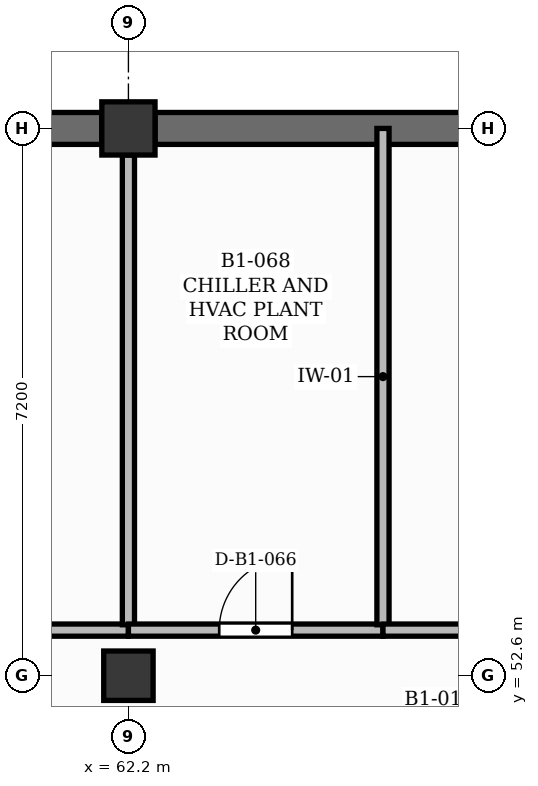
"""IFC4 building model, lengths in metres.
Left out: names, types, materials, properties, quantities, classifications, styles, units other than length and angle.
Written with IfcOpenShell. Run it as: python <this file> out.ifc"""

import sys

from ifc_helpers import new_model, si_unit, direction, frame, frame_2d, origin, origin_2d, place, context, subcontext, project, spatial, rectangle, extrude, element, fill, save


model = new_model("IFC4")
c1 = context("Model", 3, precision=1e-05, world=origin(), true_north=direction((0.0, 1.0)))
c2 = subcontext(c1, "Body", "Model", "MODEL_VIEW")
j1 = project(units=[si_unit("LENGTHUNIT", "METRE"), si_unit("PLANEANGLEUNIT", "RADIAN")], contexts=[c1])
p1 = place(None, origin())
s1 = spatial("IfcSite", under=j1, at=p1, CompositionType="ELEMENT")
p2 = place(p1, origin())
s2 = spatial("IfcBuilding", under=s1, at=p2, CompositionType="ELEMENT")
p3 = place(p2, frame((0.0, 0.0, -4.5)))
s3 = spatial("IfcBuildingStorey", under=s2, at=p3, CompositionType="ELEMENT", Elevation=-4.5)
p4 = place(p3, frame((62.2, 52.6, 0.0), z_axis=(0.0, 0.0, 1.0), x_axis=(1.0, 0.0, 0.0)))
e1 = element("IfcColumn", 1, at=p4, inside=s3, PredefinedType="COLUMN", context=c2, shape_type="SweptSolid", body=[
    extrude(rectangle(XDim=0.65, YDim=0.65, at=origin_2d()), origin(), (0.0, 0.0, 1.0), 4.2),
])
p5 = place(p3, frame((62.2, 59.8, 0.0), z_axis=(0.0, 0.0, 1.0), x_axis=(1.0, 0.0, 0.0)))
e2 = element("IfcColumn", 2, at=p5, inside=s3, PredefinedType="COLUMN", context=c2, shape_type="SweptSolid", body=[
    extrude(rectangle(XDim=0.7, YDim=0.7, at=origin_2d()), origin(), (0.0, 0.0, 1.0), 4.2),
])
p6 = place(p3, frame((58.775, 59.8, 0.0), z_axis=(0.0, 0.0, 1.0), x_axis=(1.0, 0.0, 0.0)))
e3 = element("IfcWall", 3, at=p6, inside=s3, PredefinedType="USERDEFINED", context=c2, shape_type="SweptSolid", body=[
    extrude(rectangle(XDim=3.075, YDim=0.42, at=frame_2d((1.538, 0.0))), origin(), (0.0, 0.0, 1.0), 4.2),
])
p7 = place(p3, frame((62.55, 59.8, 0.0), z_axis=(0.0, 0.0, 1.0), x_axis=(1.0, 0.0, 0.0)))
e4 = element("IfcWall", 4, at=p7, inside=s3, PredefinedType="USERDEFINED", context=c2, shape_type="SweptSolid", body=[
    extrude(rectangle(XDim=8.175, YDim=0.42, at=frame_2d((4.087, 0.0))), origin(), (0.0, 0.0, 1.0), 4.2),
])
p8 = place(p3, frame((55.0, 53.2, 0.0), z_axis=(0.0, 0.0, 1.0), x_axis=(1.0, 0.0, 0.0)))
e5 = element("IfcWall", 5, at=p8, inside=s3, PredefinedType="PARTITIONING", context=c2, shape_type="SweptSolid", body=[
    extrude(rectangle(XDim=7.2, YDim=0.16, at=frame_2d((3.6, 0.0))), origin(), (0.0, 0.0, 1.0), 4.08),
])
p9 = place(p8, frame((3.12, 0.0, 0.0)))
e6 = element("IfcOpeningElement", 6, at=p9, cuts=e5, PredefinedType="OPENING", context=c2, shape_type="SweptSolid", body=[
    extrude(rectangle(XDim=0.96, YDim=2.1, at=frame_2d((0.48, 1.05))), frame((0.0, 0.09, 0.0), z_axis=(0.0, -1.0, 0.0), x_axis=(1.0, 0.0, 0.0)), (0.0, 0.0, 1.0), 0.18),
])
p10 = place(p3, frame((62.2, 53.27, 0.0), z_axis=(0.0, 0.0, 1.0), x_axis=(0.0, 1.0, 0.0)))
e7 = element("IfcWall", 7, at=p10, inside=s3, PredefinedType="PARTITIONING", context=c2, shape_type="SweptSolid", body=[
    extrude(rectangle(XDim=6.18, YDim=0.16, at=frame_2d((3.09, 0.0))), origin(), (0.0, 0.0, 1.0), 3.5),
])
p11 = place(p3, frame((62.2, 53.2, 0.0), z_axis=(0.0, 0.0, 1.0), x_axis=(1.0, 0.0, 0.0)))
e8 = element("IfcWall", 8, at=p11, inside=s3, PredefinedType="PARTITIONING", context=c2, shape_type="SweptSolid", body=[
    extrude(rectangle(XDim=3.349, YDim=0.16, at=frame_2d((1.675, 0.0))), origin(), (0.0, 0.0, 1.0), 4.08),
])
p12 = place(p11, frame((1.195, 0.0, 0.0)))
e9 = element("IfcOpeningElement", 9, at=p12, cuts=e8, PredefinedType="OPENING", context=c2, shape_type="SweptSolid", body=[
    extrude(rectangle(XDim=0.96, YDim=2.1, at=frame_2d((0.48, 1.05))), frame((0.0, 0.09, 0.0), z_axis=(0.0, -1.0, 0.0), x_axis=(1.0, 0.0, 0.0)), (0.0, 0.0, 1.0), 0.18),
])
p13 = place(p3, frame((65.549, 53.27, 0.0), z_axis=(0.0, 0.0, 1.0), x_axis=(0.0, 1.0, 0.0)))
e10 = element("IfcWall", 10, at=p13, inside=s3, PredefinedType="PARTITIONING", context=c2, shape_type="SweptSolid", body=[
    extrude(rectangle(XDim=6.53, YDim=0.16, at=frame_2d((3.265, 0.0))), origin(), (0.0, 0.0, 1.0), 4.08),
])
p14 = place(p3, frame((65.549, 53.2, 0.0), z_axis=(0.0, 0.0, 1.0), x_axis=(1.0, 0.0, 0.0)))
e11 = element("IfcWall", 11, at=p14, inside=s3, PredefinedType="PARTITIONING", context=c2, shape_type="SweptSolid", body=[
    extrude(rectangle(XDim=6.246, YDim=0.16, at=frame_2d((3.123, 0.0))), origin(), (0.0, 0.0, 1.0), 4.08),
])
p15 = place(p14, frame((2.643, 0.0, 0.0)))
e12 = element("IfcOpeningElement", 12, at=p15, cuts=e11, PredefinedType="OPENING", context=c2, shape_type="SweptSolid", body=[
    extrude(rectangle(XDim=0.96, YDim=2.1, at=frame_2d((0.48, 1.05))), frame((0.0, 0.09, 0.0), z_axis=(0.0, -1.0, 0.0), x_axis=(1.0, 0.0, 0.0)), (0.0, 0.0, 1.0), 0.18),
])
p16 = place(p12, origin())
e13 = element("IfcDoor", 13, at=p16, inside=s3, OperationType="SINGLE_SWING_RIGHT", PredefinedType="DOOR", context=c2, shape_type="SweptSolid", body=[
    extrude(rectangle(XDim=0.96, YDim=2.1, at=frame_2d((0.48, 1.05))), frame((0.0, 0.025, 0.0), z_axis=(0.0, -1.0, 0.0), x_axis=(1.0, 0.0, 0.0)), (0.0, 0.0, 1.0), 0.05),
])
fill(e9, e13)
save(model, sys.argv[1])
